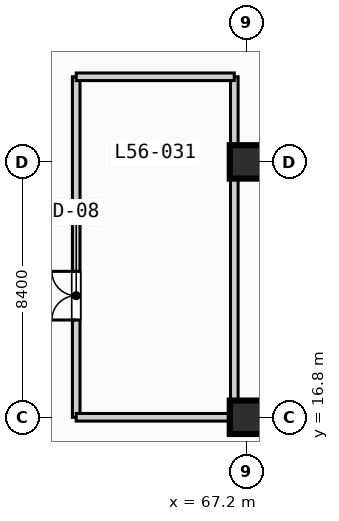
"""IFC4 building model, lengths in metres.
Left out: names, types, materials, properties, quantities, classifications, styles, units other than length and angle.
Written with IfcOpenShell. Run it as: python <this file> out.ifc"""

import sys

from ifc_helpers import new_model, si_unit, direction, frame, frame_2d, origin, origin_2d, place, context, subcontext, project, spatial, rectangle, extrude, element, fill, save


model = new_model("IFC4")
c1 = context("Model", 3, precision=1e-05, world=origin(), true_north=direction((0.0, 1.0)))
c2 = subcontext(c1, "Body", "Model", "MODEL_VIEW")
j1 = project(units=[si_unit("LENGTHUNIT", "METRE"), si_unit("PLANEANGLEUNIT", "RADIAN")], contexts=[c1])
p1 = place(None, origin())
s1 = spatial("IfcSite", under=j1, at=p1, CompositionType="ELEMENT")
p2 = place(p1, origin())
s2 = spatial("IfcBuilding", under=s1, at=p2, CompositionType="ELEMENT")
p3 = place(p2, frame((0.0, 0.0, 228.2)))
s3 = spatial("IfcBuildingStorey", under=s2, at=p3, CompositionType="ELEMENT", Elevation=228.2)
for number, where, z_axis, x_axis in (
    (1, (67.2, 16.8, 0.0), (0.0, 0.0, 1.0), (1.0, 0.0, 0.0)),
    (2, (67.2, 25.2, 0.0), (0.0, 0.0, 1.0), (1.0, 0.0, 0.0)),
):
    element("IfcColumn", number, at=place(p3, frame(where, z_axis=z_axis, x_axis=x_axis)), inside=s3, PredefinedType="COLUMN", context=c2, shape_type="SweptSolid", body=[
        extrude(rectangle(XDim=1.1, YDim=1.1, at=origin_2d()), origin(), (0.0, 0.0, 1.0), 6.0),
    ])
p4 = place(p3, frame((61.6, 16.8, 0.0), z_axis=(0.0, 0.0, 1.0), x_axis=(0.0, 1.0, 0.0)))
e3 = element("IfcWall", 3, at=p4, inside=s3, PredefinedType="SOLIDWALL", context=c2, shape_type="SweptSolid", body=[
    extrude(rectangle(XDim=11.2, YDim=0.25, at=frame_2d((5.6, 0.0))), origin(), (0.0, 0.0, 1.0), 5.77),
])
p5 = place(p4, frame((3.2, 0.0, 0.0)))
e4 = element("IfcOpeningElement", 4, at=p5, cuts=e3, PredefinedType="OPENING", context=c2, shape_type="SweptSolid", body=[
    extrude(rectangle(XDim=1.6, YDim=2.2, at=frame_2d((0.8, 1.1))), frame((0.0, 0.135, 0.0), z_axis=(0.0, -1.0, 0.0), x_axis=(1.0, 0.0, 0.0)), (0.0, 0.0, 1.0), 0.27),
])
p6 = place(p3, frame((66.8, 16.8, 0.0), z_axis=(0.0, 0.0, 1.0), x_axis=(0.0, 1.0, 0.0)))
e5 = element("IfcWall", 5, at=p6, inside=s3, PredefinedType="SOLIDWALL", context=c2, shape_type="SweptSolid", body=[
    extrude(rectangle(XDim=11.2, YDim=0.25, at=frame_2d((5.6, 0.0))), origin(), (0.0, 0.0, 1.0), 5.77),
])
p7 = place(p3, frame((61.6, 16.8, 0.0), z_axis=(0.0, 0.0, 1.0), x_axis=(1.0, 0.0, 0.0)))
e6 = element("IfcWall", 6, at=p7, inside=s3, PredefinedType="SOLIDWALL", context=c2, shape_type="SweptSolid", body=[
    extrude(rectangle(XDim=5.2, YDim=0.25, at=frame_2d((2.6, 0.0))), origin(), (0.0, 0.0, 1.0), 5.407),
])
p8 = place(p3, frame((61.6, 28.0, 0.0), z_axis=(0.0, 0.0, 1.0), x_axis=(1.0, 0.0, 0.0)))
e7 = element("IfcWall", 7, at=p8, inside=s3, PredefinedType="SOLIDWALL", context=c2, shape_type="SweptSolid", body=[
    extrude(rectangle(XDim=5.2, YDim=0.25, at=frame_2d((2.6, 0.0))), origin(), (0.0, 0.0, 1.0), 5.77),
])
p9 = place(p5, origin())
e8 = element("IfcDoor", 8, at=p9, inside=s3, OperationType="SINGLE_SWING_LEFT", PredefinedType="DOOR", context=c2, shape_type="SweptSolid", body=[
    extrude(rectangle(XDim=1.6, YDim=2.2, at=frame_2d((0.8, 1.1))), frame((0.0, 0.025, 0.0), z_axis=(0.0, -1.0, 0.0), x_axis=(1.0, 0.0, 0.0)), (0.0, 0.0, 1.0), 0.05),
])
fill(e4, e8)
save(model, sys.argv[1])
